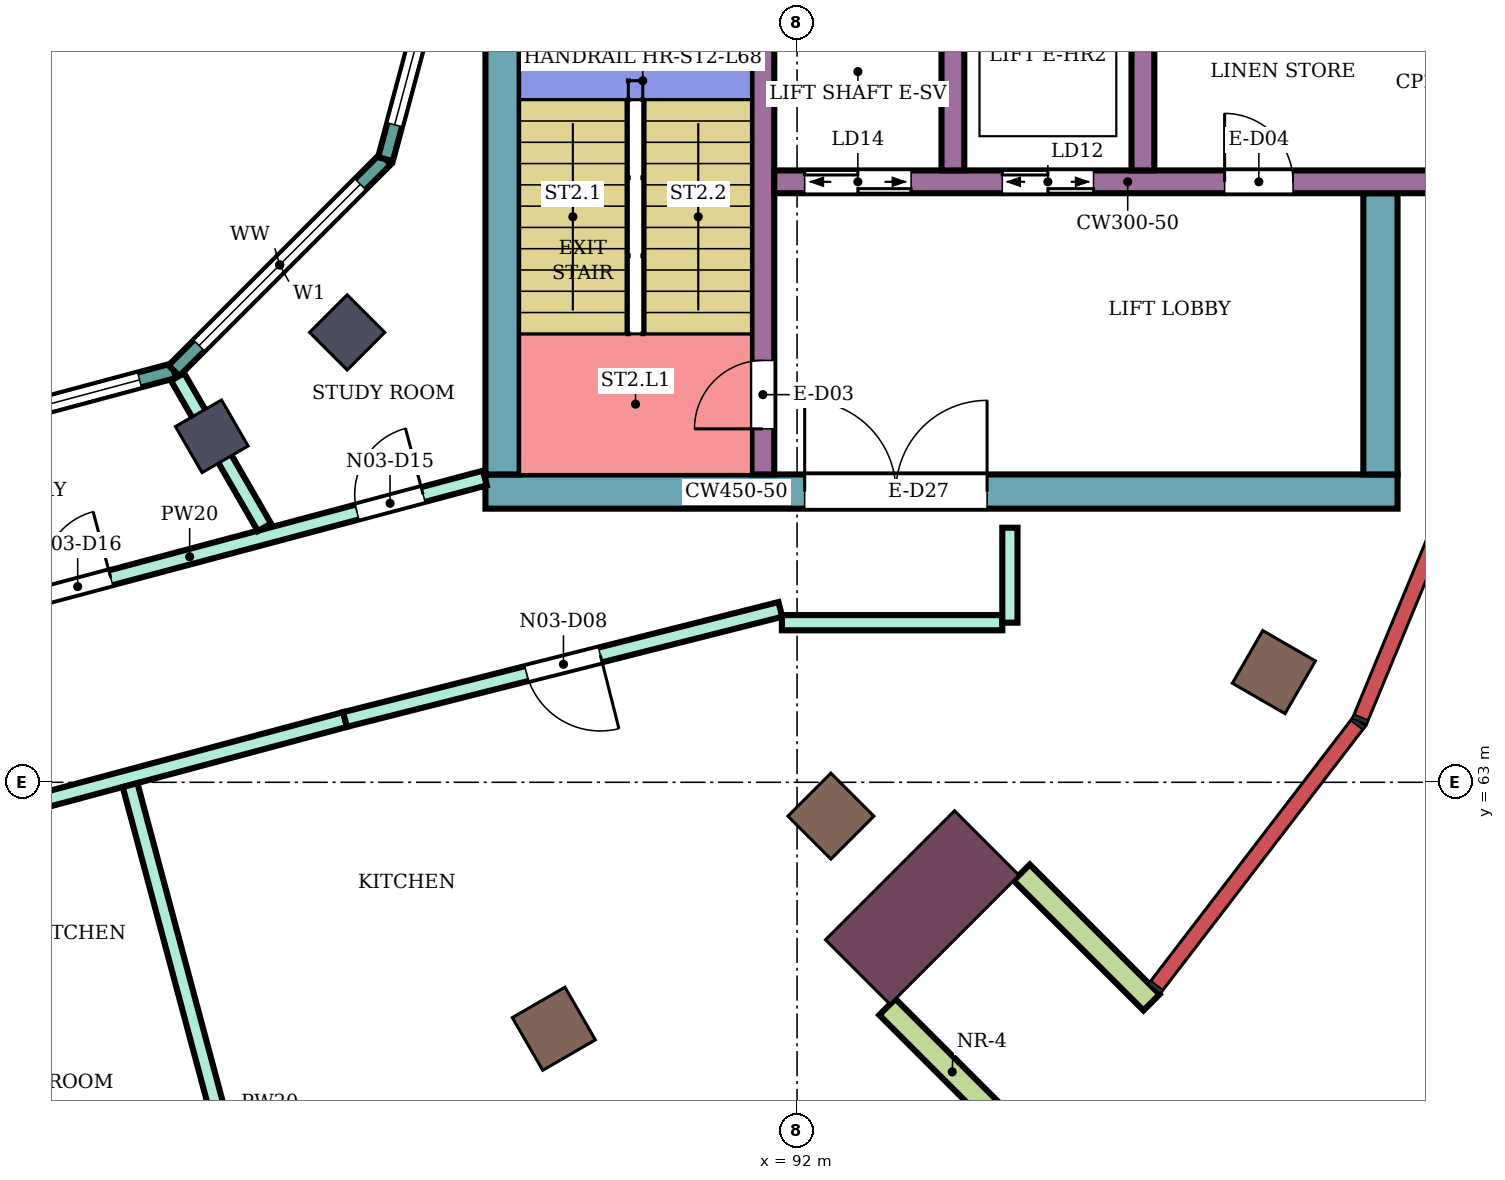
"""IFC4 building model, lengths in metres.
Left out: names, types, materials, properties, quantities, classifications, styles, units other than length and angle.
Written with IfcOpenShell. Run it as: python <this file> out.ifc"""

import sys

from ifc_helpers import new_model, si_unit, direction, frame, frame_2d, origin, origin_2d, place, context, subcontext, project, spatial, rectangle, extrude, element, fill, save


model = new_model("IFC4")
c1 = context("Model", 3, precision=1e-05, world=origin(), true_north=direction((0.0, 1.0)))
c2 = subcontext(c1, "Body", "Model", "MODEL_VIEW")
j1 = project(units=[si_unit("LENGTHUNIT", "METRE"), si_unit("PLANEANGLEUNIT", "RADIAN")], contexts=[c1])
p1 = place(None, origin())
s1 = spatial("IfcSite", under=j1, at=p1, CompositionType="ELEMENT")
p2 = place(p1, origin())
s2 = spatial("IfcBuilding", under=s1, at=p2, CompositionType="ELEMENT")
p3 = place(p2, frame((0.0, 0.0, 296.7)))
s3 = spatial("IfcBuildingStorey", under=s2, at=p3, CompositionType="ELEMENT", Elevation=296.7)
for number, where, z_axis, x_axis in (
    (1, (98.273, 64.45, 0.0), (0.0, 0.0, 1.0), (0.866, -0.5, 0.0)),
    (2, (88.8, 59.758, 0.0), (0.0, 0.0, 1.0), (0.5, -0.866, 0.0)),
    (3, (92.445, 62.555, 0.0), (0.0, 0.0, 1.0), (0.707, -0.707, 0.0)),
):
    element("IfcColumn", number, at=place(p3, frame(where, z_axis=z_axis, x_axis=x_axis)), inside=s3, PredefinedType="COLUMN", context=c2, shape_type="SweptSolid", body=[
        extrude(rectangle(XDim=0.8, YDim=0.8, at=origin_2d()), origin(), (0.0, 0.0, 1.0), 4.2),
    ])
for number, where, z_axis, x_axis in (
    (4, (84.3, 67.552, 0.0), (0.0, 0.0, 1.0), (0.5, -0.866, 0.0)),
    (5, (86.081, 68.919, 0.0), (0.0, 0.0, 1.0), (0.707, -0.707, 0.0)),
):
    element("IfcColumn", number, at=place(p3, frame(where, z_axis=z_axis, x_axis=x_axis)), inside=s3, PredefinedType="COLUMN", context=c2, shape_type="SweptSolid", body=[
        extrude(rectangle(XDim=0.7, YDim=0.7, at=origin_2d()), origin(), (0.0, 0.0, 1.0), 4.2),
    ])
p4 = place(p3, frame((93.647, 61.353, 0.0), z_axis=(0.0, 0.0, 1.0), x_axis=(0.707106781187, -0.707106781187, 0.0)))
e6 = element("IfcColumn", 6, at=p4, inside=s3, PredefinedType="COLUMN", context=c2, shape_type="SweptSolid", body=[
    extrude(rectangle(XDim=1.2, YDim=2.4, at=origin_2d()), origin(), (0.0, 0.0, 1.0), 4.2),
])
p5 = place(p3, frame((87.9, 66.825, 0.0), z_axis=(0.0, 0.0, 1.0), x_axis=(1.0, 0.0, 0.0)))
e7 = element("IfcWall", 7, at=p5, inside=s3, PredefinedType="SHEAR", context=c2, shape_type="SweptSolid", body=[
    extrude(rectangle(XDim=12.0, YDim=0.45, at=frame_2d((6.0, 0.0))), origin(), (0.0, 0.0, 1.0), 3.88),
])
p6 = place(p5, frame((4.2, 0.0, 0.0)))
e8 = element("IfcOpeningElement", 8, at=p6, cuts=e7, PredefinedType="OPENING", context=c2, shape_type="SweptSolid", body=[
    extrude(rectangle(XDim=2.4, YDim=2.4, at=frame_2d((1.2, 1.2))), frame((0.0, 0.235, 0.0), z_axis=(0.0, -1.0, 0.0), x_axis=(1.0, 0.0, 0.0)), (0.0, 0.0, 1.0), 0.47),
])
p7 = place(p3, frame((88.125, 67.05, 0.0), z_axis=(0.0, 0.0, 1.0), x_axis=(0.0, 1.0, 0.0)))
e9 = element("IfcWall", 9, at=p7, inside=s3, PredefinedType="SHEAR", context=c2, shape_type="SweptSolid", body=[
    extrude(rectangle(XDim=7.95, YDim=0.45, at=frame_2d((3.975, 0.0))), origin(), (0.0, 0.0, 1.0), 3.88),
])
p8 = place(p3, frame((99.675, 67.05, 0.0), z_axis=(0.0, 0.0, 1.0), x_axis=(0.0, 1.0, 0.0)))
e10 = element("IfcWall", 10, at=p8, inside=s3, PredefinedType="SHEAR", context=c2, shape_type="SweptSolid", body=[
    extrude(rectangle(XDim=3.7, YDim=0.45, at=frame_2d((1.85, 0.0))), origin(), (0.0, 0.0, 1.0), 3.88),
])
p9 = place(p3, frame((91.55, 67.05, 0.0), z_axis=(0.0, 0.0, 1.0), x_axis=(0.0, 1.0, 0.0)))
e11 = element("IfcWall", 11, at=p9, inside=s3, PredefinedType="SHEAR", context=c2, shape_type="SweptSolid", body=[
    extrude(rectangle(XDim=7.95, YDim=0.3, at=frame_2d((3.975, 0.0))), origin(), (0.0, 0.0, 1.0), 3.88),
])
p10 = place(p9, frame((0.6, 0.0, 0.0)))
e12 = element("IfcOpeningElement", 12, at=p10, cuts=e11, PredefinedType="OPENING", context=c2, shape_type="SweptSolid", body=[
    extrude(rectangle(XDim=0.9, YDim=2.1, at=frame_2d((0.45, 1.05))), frame((0.0, 0.16, 0.0), z_axis=(0.0, -1.0, 0.0), x_axis=(1.0, 0.0, 0.0)), (0.0, 0.0, 1.0), 0.32),
])
p11 = place(p3, frame((91.7, 70.9, 0.0), z_axis=(0.0, 0.0, 1.0), x_axis=(1.0, 0.0, 0.0)))
e13 = element("IfcWall", 13, at=p11, inside=s3, PredefinedType="SHEAR", context=c2, shape_type="SweptSolid", body=[
    extrude(rectangle(XDim=9.3, YDim=0.3, at=frame_2d((4.65, 0.0))), origin(), (0.0, 0.0, 1.0), 3.88),
])
p12 = place(p11, frame((0.4, 0.0, 0.0)))
e14 = element("IfcOpeningElement", 14, at=p12, cuts=e13, PredefinedType="OPENING", context=c2, shape_type="SweptSolid", body=[
    extrude(rectangle(XDim=1.4, YDim=2.1, at=frame_2d((0.7, 1.05))), frame((0.0, 0.16, 0.0), z_axis=(0.0, -1.0, 0.0), x_axis=(1.0, 0.0, 0.0)), (0.0, 0.0, 1.0), 0.32),
])
p13 = place(p11, frame((3.0, 0.0, 0.0)))
e15 = element("IfcOpeningElement", 15, at=p13, cuts=e13, PredefinedType="OPENING", context=c2, shape_type="SweptSolid", body=[
    extrude(rectangle(XDim=1.2, YDim=2.1, at=frame_2d((0.6, 1.05))), frame((0.0, 0.16, 0.0), z_axis=(0.0, -1.0, 0.0), x_axis=(1.0, 0.0, 0.0)), (0.0, 0.0, 1.0), 0.32),
])
p14 = place(p11, frame((5.925, 0.0, 0.0)))
e16 = element("IfcOpeningElement", 16, at=p14, cuts=e13, PredefinedType="OPENING", context=c2, shape_type="SweptSolid", body=[
    extrude(rectangle(XDim=0.9, YDim=2.1, at=frame_2d((0.45, 1.05))), frame((0.0, 0.16, 0.0), z_axis=(0.0, -1.0, 0.0), x_axis=(1.0, 0.0, 0.0)), (0.0, 0.0, 1.0), 0.32),
])
for number, where, z_axis, x_axis in (
    (17, (94.05, 71.05, 0.0), (0.0, 0.0, 1.0), (0.0, 1.0, 0.0)),
    (18, (96.55, 71.05, 0.0), (0.0, 0.0, 1.0), (0.0, 1.0, 0.0)),
):
    element("IfcWall", number, at=place(p3, frame(where, z_axis=z_axis, x_axis=x_axis)), inside=s3, PredefinedType="SHEAR", context=c2, shape_type="SweptSolid", body=[
        extrude(rectangle(XDim=2.55, YDim=0.3, at=frame_2d((1.275, 0.0))), origin(), (0.0, 0.0, 1.0), 3.88),
    ])
for number, where, z_axis, x_axis in (
    (19, (93.188, 60.045, 0.0), (0.0, 0.0, 1.0), (0.707, -0.707, 0.0)),
    (20, (94.955, 61.812, 0.0), (0.0, 0.0, 1.0), (0.707, -0.707, 0.0)),
):
    element("IfcWall", number, at=place(p3, frame(where, z_axis=z_axis, x_axis=x_axis)), inside=s3, PredefinedType="NOTDEFINED", context=c2, shape_type="SweptSolid", body=[
        extrude(rectangle(XDim=2.416, YDim=0.3, at=frame_2d((1.208, 0.0))), origin(), (0.0, 0.0, 1.0), 4.2),
    ])
p15 = place(p3, frame((80.0, 67.396, 0.0), z_axis=(0.0, 0.0, 1.0), x_axis=(0.965933654434, 0.258789828301, 0.0)))
e21 = element("IfcWall", 21, at=p15, inside=s3, PredefinedType="NOTDEFINED", context=c2, shape_type="SweptSolid", body=[
    extrude(rectangle(XDim=3.936, YDim=0.2, at=frame_2d((1.968, 0.0))), origin(), (0.0, 0.0, 1.0), 4.2),
])
p16 = place(p15, frame((0.468, 0.0, 0.9)))
e22 = element("IfcOpeningElement", 22, at=p16, cuts=e21, PredefinedType="OPENING", context=c2, shape_type="SweptSolid", body=[
    extrude(rectangle(XDim=3.0, YDim=2.3, at=frame_2d((1.5, 1.15))), frame((0.0, 0.11, 0.0), z_axis=(0.0, -1.0, 0.0), x_axis=(1.0, 0.0, 0.0)), (0.0, 0.0, 1.0), 0.22),
])
p17 = place(p3, frame((83.802, 68.415, 0.0), z_axis=(0.0, 0.0, 1.0), x_axis=(0.707106781187, 0.707106781187, 0.0)))
e23 = element("IfcWall", 23, at=p17, inside=s3, PredefinedType="NOTDEFINED", context=c2, shape_type="SweptSolid", body=[
    extrude(rectangle(XDim=3.936, YDim=0.2, at=frame_2d((1.968, 0.0))), origin(), (0.0, 0.0, 1.0), 4.2),
])
p18 = place(p17, frame((0.468, 0.0, 0.9)))
e24 = element("IfcOpeningElement", 24, at=p18, cuts=e23, PredefinedType="OPENING", context=c2, shape_type="SweptSolid", body=[
    extrude(rectangle(XDim=3.0, YDim=2.3, at=frame_2d((1.5, 1.15))), frame((0.0, 0.11, 0.0), z_axis=(0.0, -1.0, 0.0), x_axis=(1.0, 0.0, 0.0)), (0.0, 0.0, 1.0), 0.22),
])
p19 = place(p3, frame((86.585, 71.198, 0.0), z_axis=(0.0, 0.0, 1.0), x_axis=(0.258789828301, 0.965933654434, 0.0)))
e25 = element("IfcWall", 25, at=p19, inside=s3, PredefinedType="NOTDEFINED", context=c2, shape_type="SweptSolid", body=[
    extrude(rectangle(XDim=3.936, YDim=0.2, at=frame_2d((1.968, 0.0))), origin(), (0.0, 0.0, 1.0), 4.2),
])
p20 = place(p19, frame((0.468, 0.0, 0.9)))
e26 = element("IfcOpeningElement", 26, at=p20, cuts=e25, PredefinedType="OPENING", context=c2, shape_type="SweptSolid", body=[
    extrude(rectangle(XDim=3.0, YDim=2.3, at=frame_2d((1.5, 1.15))), frame((0.0, 0.11, 0.0), z_axis=(0.0, -1.0, 0.0), x_axis=(1.0, 0.0, 0.0)), (0.0, 0.0, 1.0), 0.22),
])
p21 = place(p3, frame((80.125, 64.932, 0.0), z_axis=(0.0, 0.0, 1.0), x_axis=(0.966236955806, 0.257655089674, 0.0)))
e27 = element("IfcWall", 27, at=p21, inside=s3, PredefinedType="PARTITIONING", context=c2, shape_type="SweptSolid", body=[
    extrude(rectangle(XDim=8.039, YDim=0.2, at=frame_2d((4.02, 0.0))), origin(), (0.0, 0.0, 1.0), 3.75),
])
p22 = place(p21, frame((6.298, 0.0, 0.0)))
e28 = element("IfcOpeningElement", 28, at=p22, cuts=e27, PredefinedType="OPENING", context=c2, shape_type="SweptSolid", body=[
    extrude(rectangle(XDim=0.9, YDim=2.1, at=frame_2d((0.45, 1.05))), frame((0.0, 0.11, 0.0), z_axis=(0.0, -1.0, 0.0), x_axis=(1.0, 0.0, 0.0)), (0.0, 0.0, 1.0), 0.22),
])
p23 = place(p21, frame((2.045, 0.0, 0.0)))
e29 = element("IfcOpeningElement", 29, at=p23, cuts=e27, PredefinedType="OPENING", context=c2, shape_type="SweptSolid", body=[
    extrude(rectangle(XDim=0.9, YDim=2.1, at=frame_2d((0.45, 1.05))), frame((0.0, 0.11, 0.0), z_axis=(0.0, -1.0, 0.0), x_axis=(1.0, 0.0, 0.0)), (0.0, 0.0, 1.0), 0.22),
])
p24 = place(p3, frame((80.048, 62.217, 0.0), z_axis=(0.0, 0.0, 1.0), x_axis=(0.965937709386, 0.258774692708, 0.0)))
e30 = element("IfcWall", 30, at=p24, inside=s3, PredefinedType="PARTITIONING", context=c2, shape_type="SweptSolid", body=[
    extrude(rectangle(XDim=6.216, YDim=0.2, at=frame_2d((3.108, 0.0))), origin(), (0.0, 0.0, 1.0), 3.75),
])
p25 = place(p24, frame((0.5, 0.0, 0.0)))
e31 = element("IfcOpeningElement", 31, at=p25, cuts=e30, PredefinedType="OPENING", context=c2, shape_type="SweptSolid", body=[
    extrude(rectangle(XDim=1.0, YDim=2.1, at=frame_2d((0.5, 1.05))), frame((0.0, 0.11, 0.0), z_axis=(0.0, -1.0, 0.0), x_axis=(1.0, 0.0, 0.0)), (0.0, 0.0, 1.0), 0.22),
])
p26 = place(p3, frame((83.225, 62.963, 0.0), z_axis=(0.0, 0.0, 1.0), x_axis=(0.258782398991, -0.96593564484, 0.0)))
e32 = element("IfcWall", 32, at=p26, inside=s3, PredefinedType="PARTITIONING", context=c2, shape_type="SweptSolid", body=[
    extrude(rectangle(XDim=9.837, YDim=0.2, at=frame_2d((4.918, 0.0))), origin(), (0.0, 0.0, 1.0), 3.75),
])
p27 = place(p3, frame((83.85, 68.333, 0.0), z_axis=(0.0, 0.0, 1.0), x_axis=(0.500080019051, -0.865979199835, 0.0)))
e33 = element("IfcWall", 33, at=p27, inside=s3, PredefinedType="PARTITIONING", context=c2, shape_type="SweptSolid", body=[
    extrude(rectangle(XDim=2.285, YDim=0.2, at=frame_2d((1.143, 0.0))), origin(), (0.0, 0.0, 1.0), 3.75),
])
p28 = place(p3, frame((86.053, 63.826, 0.0), z_axis=(0.0, 0.0, 1.0), x_axis=(0.969480070232, 0.245170131586, 0.0)))
e34 = element("IfcWall", 34, at=p28, inside=s3, PredefinedType="PARTITIONING", context=c2, shape_type="SweptSolid", body=[
    extrude(rectangle(XDim=5.907, YDim=0.2, at=frame_2d((2.954, 0.0))), origin(), (0.0, 0.0, 1.0), 3.75),
])
p29 = place(p28, frame((2.464, 0.0, 0.0)))
e35 = element("IfcOpeningElement", 35, at=p29, cuts=e34, PredefinedType="OPENING", context=c2, shape_type="SweptSolid", body=[
    extrude(rectangle(XDim=1.0, YDim=2.1, at=frame_2d((0.5, 1.05))), frame((0.0, 0.11, 0.0), z_axis=(0.0, -1.0, 0.0), x_axis=(1.0, 0.0, 0.0)), (0.0, 0.0, 1.0), 0.22),
])
p30 = place(p3, frame((91.8, 65.1, 0.0), z_axis=(0.0, 0.0, 1.0), x_axis=(1.0, 0.0, 0.0)))
e36 = element("IfcWall", 36, at=p30, inside=s3, PredefinedType="PARTITIONING", context=c2, shape_type="SweptSolid", body=[
    extrude(rectangle(XDim=2.9, YDim=0.2, at=frame_2d((1.45, 0.0))), origin(), (0.0, 0.0, 1.0), 3.75),
])
p31 = place(p3, frame((94.8, 65.1, 0.0), z_axis=(0.0, 0.0, 1.0), x_axis=(0.0, 1.0, 0.0)))
e37 = element("IfcWall", 37, at=p31, inside=s3, PredefinedType="PARTITIONING", context=c2, shape_type="SweptSolid", body=[
    extrude(rectangle(XDim=1.249, YDim=0.2, at=frame_2d((0.625, 0.0))), origin(), (0.0, 0.0, 1.0), 3.75),
])
p32 = place(p16, origin())
e38 = element("IfcWindow", 38, at=p32, inside=s3, PartitioningType="SINGLE_PANEL", PredefinedType="WINDOW", context=c2, shape_type="SweptSolid", body=[
    extrude(rectangle(XDim=3.0, YDim=2.3, at=frame_2d((1.5, 1.15))), frame((0.0, 0.03, 0.0), z_axis=(0.0, -1.0, 0.0), x_axis=(1.0, 0.0, 0.0)), (0.0, 0.0, 1.0), 0.06),
])
fill(e22, e38)
p33 = place(p18, origin())
e39 = element("IfcWindow", 39, at=p33, inside=s3, PartitioningType="SINGLE_PANEL", PredefinedType="WINDOW", context=c2, shape_type="SweptSolid", body=[
    extrude(rectangle(XDim=3.0, YDim=2.3, at=frame_2d((1.5, 1.15))), frame((0.0, 0.03, 0.0), z_axis=(0.0, -1.0, 0.0), x_axis=(1.0, 0.0, 0.0)), (0.0, 0.0, 1.0), 0.06),
])
fill(e24, e39)
p34 = place(p20, origin())
e40 = element("IfcWindow", 40, at=p34, inside=s3, PartitioningType="SINGLE_PANEL", PredefinedType="WINDOW", context=c2, shape_type="SweptSolid", body=[
    extrude(rectangle(XDim=3.0, YDim=2.3, at=frame_2d((1.5, 1.15))), frame((0.0, 0.03, 0.0), z_axis=(0.0, -1.0, 0.0), x_axis=(1.0, 0.0, 0.0)), (0.0, 0.0, 1.0), 0.06),
])
fill(e26, e40)
p35 = place(p29, frame((1.0, 0.0, 0.0), z_axis=(0.0, 0.0, 1.0), x_axis=(-1.0, 0.0, 0.0)))
e41 = element("IfcDoor", 41, at=p35, inside=s3, OperationType="SINGLE_SWING_LEFT", PredefinedType="DOOR", context=c2, shape_type="SweptSolid", body=[
    extrude(rectangle(XDim=1.0, YDim=2.1, at=frame_2d((0.5, 1.05))), frame((0.0, 0.025, 0.0), z_axis=(0.0, -1.0, 0.0), x_axis=(1.0, 0.0, 0.0)), (0.0, 0.0, 1.0), 0.05),
])
fill(e35, e41)
p36 = place(p22, origin())
e42 = element("IfcDoor", 42, at=p36, inside=s3, OperationType="SINGLE_SWING_RIGHT", PredefinedType="DOOR", context=c2, shape_type="SweptSolid", body=[
    extrude(rectangle(XDim=0.9, YDim=2.1, at=frame_2d((0.45, 1.05))), frame((0.0, 0.025, 0.0), z_axis=(0.0, -1.0, 0.0), x_axis=(1.0, 0.0, 0.0)), (0.0, 0.0, 1.0), 0.05),
])
fill(e28, e42)
p37 = place(p23, origin())
e43 = element("IfcDoor", 43, at=p37, inside=s3, OperationType="SINGLE_SWING_RIGHT", PredefinedType="DOOR", context=c2, shape_type="SweptSolid", body=[
    extrude(rectangle(XDim=0.9, YDim=2.1, at=frame_2d((0.45, 1.05))), frame((0.0, 0.025, 0.0), z_axis=(0.0, -1.0, 0.0), x_axis=(1.0, 0.0, 0.0)), (0.0, 0.0, 1.0), 0.05),
])
fill(e29, e43)
p38 = place(p10, origin())
e44 = element("IfcDoor", 44, at=p38, inside=s3, OperationType="SINGLE_SWING_LEFT", PredefinedType="DOOR", context=c2, shape_type="SweptSolid", body=[
    extrude(rectangle(XDim=0.9, YDim=2.1, at=frame_2d((0.45, 1.05))), frame((0.0, 0.025, 0.0), z_axis=(0.0, -1.0, 0.0), x_axis=(1.0, 0.0, 0.0)), (0.0, 0.0, 1.0), 0.05),
])
fill(e12, e44)
p39 = place(p12, origin())
e45 = element("IfcDoor", 45, at=p39, inside=s3, OperationType="DOUBLE_DOOR_SLIDING", PredefinedType="DOOR", context=c2, shape_type="SweptSolid", body=[
    extrude(rectangle(XDim=1.4, YDim=2.1, at=frame_2d((0.7, 1.05))), frame((0.0, 0.025, 0.0), z_axis=(0.0, -1.0, 0.0), x_axis=(1.0, 0.0, 0.0)), (0.0, 0.0, 1.0), 0.05),
])
fill(e14, e45)
p40 = place(p13, origin())
e46 = element("IfcDoor", 46, at=p40, inside=s3, OperationType="DOUBLE_DOOR_SLIDING", PredefinedType="DOOR", context=c2, shape_type="SweptSolid", body=[
    extrude(rectangle(XDim=1.2, YDim=2.1, at=frame_2d((0.6, 1.05))), frame((0.0, 0.025, 0.0), z_axis=(0.0, -1.0, 0.0), x_axis=(1.0, 0.0, 0.0)), (0.0, 0.0, 1.0), 0.05),
])
fill(e15, e46)
p41 = place(p14, origin())
e47 = element("IfcDoor", 47, at=p41, inside=s3, OperationType="SINGLE_SWING_LEFT", PredefinedType="DOOR", context=c2, shape_type="SweptSolid", body=[
    extrude(rectangle(XDim=0.9, YDim=2.1, at=frame_2d((0.45, 1.05))), frame((0.0, 0.025, 0.0), z_axis=(0.0, -1.0, 0.0), x_axis=(1.0, 0.0, 0.0)), (0.0, 0.0, 1.0), 0.05),
])
fill(e16, e47)
p42 = place(p6, origin())
e48 = element("IfcDoor", 48, at=p42, inside=s3, OperationType="DOUBLE_DOOR_SINGLE_SWING", PredefinedType="DOOR", context=c2, shape_type="SweptSolid", body=[
    extrude(rectangle(XDim=2.4, YDim=2.4, at=frame_2d((1.2, 1.2))), frame((0.0, 0.025, 0.0), z_axis=(0.0, -1.0, 0.0), x_axis=(1.0, 0.0, 0.0)), (0.0, 0.0, 1.0), 0.05),
])
fill(e8, e48)
save(model, sys.argv[1])
